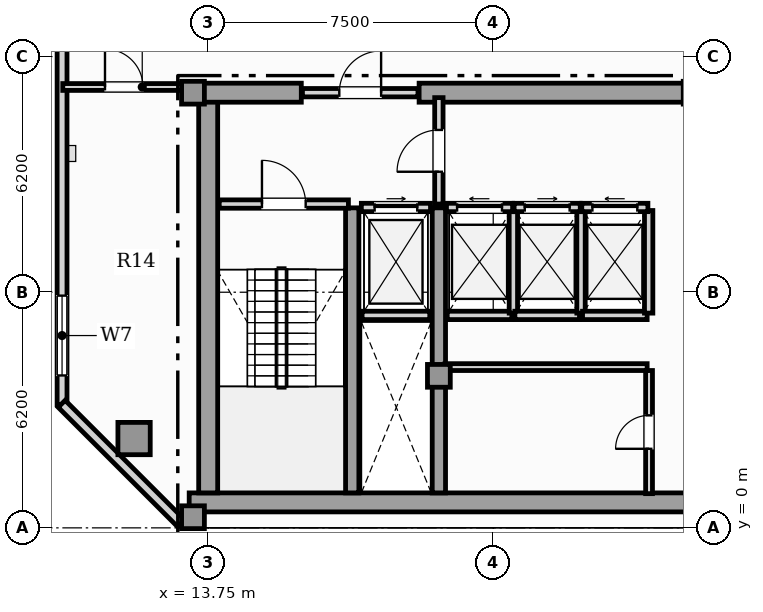
"""IFC4 building model, lengths in metres.
Left out: names, types, materials, properties, quantities, classifications, styles, units other than length and angle.
Written with IfcOpenShell. Run it as: python <this file> out.ifc"""

import sys

from ifc_helpers import new_model, si_unit, direction, frame, frame_2d, origin, origin_2d, place, context, subcontext, project, spatial, rectangle, hollow_rectangle, extrude, element, fill, save


model = new_model("IFC4")
c1 = context("Model", 3, precision=1e-05, world=origin(), true_north=direction((0.0, 1.0)))
c2 = subcontext(c1, "Body", "Model", "MODEL_VIEW")
j1 = project(units=[si_unit("LENGTHUNIT", "METRE"), si_unit("PLANEANGLEUNIT", "RADIAN")], contexts=[c1])
p1 = place(None, origin())
s1 = spatial("IfcSite", under=j1, at=p1, CompositionType="ELEMENT")
p2 = place(p1, origin())
s2 = spatial("IfcBuilding", under=s1, at=p2, CompositionType="ELEMENT")
p3 = place(p2, frame((0.0, 0.0, 362.25)))
s3 = spatial("IfcBuildingStorey", under=s2, at=p3, CompositionType="ELEMENT", Elevation=362.25)
p4 = place(p3, frame((13.25, 0.67, 0.0), z_axis=(0.0, 0.0, 1.0), x_axis=(1.0, 0.0, 0.0)))
e1 = element("IfcWall", 1, at=p4, inside=s3, PredefinedType="SHEAR", context=c2, shape_type="SweptSolid", body=[
    extrude(rectangle(XDim=31.0, YDim=0.5, at=frame_2d((15.5, 0.0))), origin(), (0.0, 0.0, 1.0), 4.1),
])
p5 = place(p3, frame((13.75, 0.92, 0.0), z_axis=(0.0, 0.0, 1.0), x_axis=(0.0, 1.0, 0.0)))
e2 = element("IfcWall", 2, at=p5, inside=s3, PredefinedType="SHEAR", context=c2, shape_type="SweptSolid", body=[
    extrude(rectangle(XDim=10.53, YDim=0.5, at=frame_2d((5.265, 0.0))), origin(), (0.0, 0.0, 1.0), 4.1),
])
p6 = place(p3, frame((13.25, 11.45, 0.0), z_axis=(0.0, 0.0, 1.0), x_axis=(1.0, 0.0, 0.0)))
e3 = element("IfcWall", 3, at=p6, inside=s3, PredefinedType="SHEAR", context=c2, shape_type="SweptSolid", body=[
    extrude(rectangle(XDim=2.95, YDim=0.5, at=frame_2d((1.475, 0.0))), origin(), (0.0, 0.0, 1.0), 4.1),
])
p7 = place(p3, frame((19.3, 11.45, 0.0), z_axis=(0.0, 0.0, 1.0), x_axis=(1.0, 0.0, 0.0)))
e4 = element("IfcWall", 4, at=p7, inside=s3, PredefinedType="SHEAR", context=c2, shape_type="SweptSolid", body=[
    extrude(rectangle(XDim=7.3, YDim=0.5, at=frame_2d((3.65, 0.0))), origin(), (0.0, 0.0, 1.0), 4.1),
])
for number, where, z_axis, x_axis in (
    (5, (17.54, 0.92, 0.0), (0.0, 0.0, 1.0), (0.0, 1.0, 0.0)),
    (6, (19.82, 0.92, 0.0), (0.0, 0.0, 1.0), (0.0, 1.0, 0.0)),
):
    element("IfcWall", number, at=place(p3, frame(where, z_axis=z_axis, x_axis=x_axis)), inside=s3, PredefinedType="SHEAR", context=c2, shape_type="SweptSolid", body=[
        extrude(rectangle(XDim=7.5, YDim=0.35, at=frame_2d((3.75, 0.0))), origin(), (0.0, 0.0, 1.0), 4.1),
    ])
for number, where, z_axis, x_axis in (
    (7, (13.35, 0.28, 0.0), (0.0, 0.0, 1.0), (1.0, 0.0, 0.0)),
    (8, (13.35, 11.45, 0.0), (0.0, 0.0, 1.0), (1.0, 0.0, 0.0)),
    (9, (19.82, 4.0, 0.0), (0.0, 0.0, 1.0), (1.0, 0.0, 0.0)),
    (10, (26.55, 11.45, 0.0), (0.0, 0.0, 1.0), (1.0, 0.0, 0.0)),
):
    element("IfcColumn", number, at=place(p3, frame(where, z_axis=z_axis, x_axis=x_axis)), inside=s3, PredefinedType="COLUMN", context=c2, shape_type="SweptSolid", body=[
        extrude(rectangle(XDim=0.6, YDim=0.6, at=origin_2d()), origin(), (0.0, 0.0, 1.0), 4.4),
    ])
p8 = place(p3, frame((11.8, 2.35, 0.0), z_axis=(0.0, 0.0, 1.0), x_axis=(1.0, 0.0, 0.0)))
e11 = element("IfcColumn", 11, at=p8, inside=s3, PredefinedType="USERDEFINED", context=c2, shape_type="SweptSolid", body=[
    extrude(hollow_rectangle(XDim=0.85, YDim=0.85, WallThickness=0.05, at=origin_2d()), origin(), (0.0, 0.0, 1.0), 4.35),
])
p9 = place(p3, frame((9.905, 27.38, 0.0), z_axis=(0.0, 0.0, 1.0), x_axis=(0.0, -1.0, 0.0)))
e12 = element("IfcWall", 12, at=p9, inside=s3, PredefinedType="SOLIDWALL", context=c2, shape_type="SweptSolid", body=[
    extrude(rectangle(XDim=24.14, YDim=0.26, at=frame_2d((12.07, 0.0))), origin(), (0.0, 0.0, 1.0), 4.1),
])
p10 = place(p9, frame((21.27, 0.0, 0.85)))
e13 = element("IfcOpeningElement", 13, at=p10, cuts=e12, PredefinedType="OPENING", context=c2, shape_type="SweptSolid", body=[
    extrude(rectangle(XDim=2.1, YDim=2.05, at=frame_2d((1.05, 1.025))), frame((0.0, 0.14, 0.0), z_axis=(0.0, -1.0, 0.0), x_axis=(1.0, 0.0, 0.0)), (0.0, 0.0, 1.0), 0.28),
])
p11 = place(p9, frame((2.83, 0.0, 0.95)))
e14 = element("IfcOpeningElement", 14, at=p11, cuts=e12, PredefinedType="OPENING", context=c2, shape_type="SweptSolid", body=[
    extrude(rectangle(XDim=0.9, YDim=1.5, at=frame_2d((0.45, 0.75))), frame((0.0, 0.14, 0.0), z_axis=(0.0, -1.0, 0.0), x_axis=(1.0, 0.0, 0.0)), (0.0, 0.0, 1.0), 0.28),
])
p12 = place(p9, frame((7.445, 0.0, 0.9)))
e15 = element("IfcOpeningElement", 15, at=p12, cuts=e12, PredefinedType="OPENING", context=c2, shape_type="SweptSolid", body=[
    extrude(rectangle(XDim=1.5, YDim=1.95, at=frame_2d((0.75, 0.975))), frame((0.0, 0.14, 0.0), z_axis=(0.0, -1.0, 0.0), x_axis=(1.0, 0.0, 0.0)), (0.0, 0.0, 1.0), 0.28),
])
p13 = place(p3, frame((9.895, 3.264, 0.0), z_axis=(0.0, 0.0, 1.0), x_axis=(0.707079321262, -0.707134240044, 0.0)))
e16 = element("IfcWall", 16, at=p13, inside=s3, PredefinedType="SOLIDWALL", context=c2, shape_type="SweptSolid", body=[
    extrude(rectangle(XDim=4.446, YDim=0.26, at=frame_2d((2.223, 0.0))), origin(), (0.0, 0.0, 1.0), 4.1),
])
p14 = place(p3, frame((17.8, 5.59, 0.0), z_axis=(0.0, 0.0, 1.0), x_axis=(1.0, 0.0, 0.0)))
e17 = element("IfcWall", 17, at=p14, inside=s3, PredefinedType="SOLIDWALL", context=c2, shape_type="SweptSolid", body=[
    extrude(rectangle(XDim=1.78, YDim=0.22, at=frame_2d((0.89, 0.0))), origin(), (0.0, 0.0, 1.0), 4.1),
])
p15 = place(p3, frame((17.78, 8.43, 0.0), z_axis=(0.0, 0.0, 1.0), x_axis=(1.0, 0.0, 0.0)))
e18 = element("IfcWall", 18, at=p15, inside=s3, PredefinedType="SOLIDWALL", context=c2, shape_type="SweptSolid", body=[
    extrude(rectangle(XDim=1.82, YDim=0.22, at=frame_2d((0.91, 0.0))), origin(), (0.0, 0.0, 1.0), 4.1),
])
p16 = place(p15, frame((0.35, 0.0, 0.0)))
e19 = element("IfcOpeningElement", 19, at=p16, cuts=e18, PredefinedType="OPENING", context=c2, shape_type="SweptSolid", body=[
    extrude(rectangle(XDim=1.12, YDim=2.25, at=frame_2d((0.56, 1.125))), frame((0.0, 0.12, 0.0), z_axis=(0.0, -1.0, 0.0), x_axis=(1.0, 0.0, 0.0)), (0.0, 0.0, 1.0), 0.24),
])
p17 = place(p3, frame((20.04, 5.59, 0.0), z_axis=(0.0, 0.0, 1.0), x_axis=(1.0, 0.0, 0.0)))
e20 = element("IfcWall", 20, at=p17, inside=s3, PredefinedType="SOLIDWALL", context=c2, shape_type="SweptSolid", body=[
    extrude(rectangle(XDim=1.7, YDim=0.22, at=frame_2d((0.85, 0.0))), origin(), (0.0, 0.0, 1.0), 4.1),
])
p18 = place(p3, frame((21.78, 5.65, 0.0), z_axis=(0.0, 0.0, 1.0), x_axis=(0.0, 1.0, 0.0)))
e21 = element("IfcWall", 21, at=p18, inside=s3, PredefinedType="SOLIDWALL", context=c2, shape_type="SweptSolid", body=[
    extrude(rectangle(XDim=2.7, YDim=0.22, at=frame_2d((1.35, 0.0))), origin(), (0.0, 0.0, 1.0), 4.1),
])
p19 = place(p3, frame((20.02, 8.43, 0.0), z_axis=(0.0, 0.0, 1.0), x_axis=(1.0, 0.0, 0.0)))
e22 = element("IfcWall", 22, at=p19, inside=s3, PredefinedType="SOLIDWALL", context=c2, shape_type="SweptSolid", body=[
    extrude(rectangle(XDim=1.74, YDim=0.22, at=frame_2d((0.87, 0.0))), origin(), (0.0, 0.0, 1.0), 4.1),
])
p20 = place(p19, frame((0.28, 0.0, 0.0)))
e23 = element("IfcOpeningElement", 23, at=p20, cuts=e22, PredefinedType="OPENING", context=c2, shape_type="SweptSolid", body=[
    extrude(rectangle(XDim=1.18, YDim=2.2, at=frame_2d((0.59, 1.1))), frame((0.0, 0.12, 0.0), z_axis=(0.0, -1.0, 0.0), x_axis=(1.0, 0.0, 0.0)), (0.0, 0.0, 1.0), 0.24),
])
p21 = place(p3, frame((21.82, 5.59, 0.0), z_axis=(0.0, 0.0, 1.0), x_axis=(1.0, 0.0, 0.0)))
e24 = element("IfcWall", 24, at=p21, inside=s3, PredefinedType="SOLIDWALL", context=c2, shape_type="SweptSolid", body=[
    extrude(rectangle(XDim=1.7, YDim=0.22, at=frame_2d((0.85, 0.0))), origin(), (0.0, 0.0, 1.0), 4.1),
])
p22 = place(p3, frame((23.56, 5.65, 0.0), z_axis=(0.0, 0.0, 1.0), x_axis=(0.0, 1.0, 0.0)))
e25 = element("IfcWall", 25, at=p22, inside=s3, PredefinedType="SOLIDWALL", context=c2, shape_type="SweptSolid", body=[
    extrude(rectangle(XDim=2.7, YDim=0.22, at=frame_2d((1.35, 0.0))), origin(), (0.0, 0.0, 1.0), 4.1),
])
p23 = place(p3, frame((21.8, 8.43, 0.0), z_axis=(0.0, 0.0, 1.0), x_axis=(1.0, 0.0, 0.0)))
e26 = element("IfcWall", 26, at=p23, inside=s3, PredefinedType="SOLIDWALL", context=c2, shape_type="SweptSolid", body=[
    extrude(rectangle(XDim=1.74, YDim=0.22, at=frame_2d((0.87, 0.0))), origin(), (0.0, 0.0, 1.0), 4.1),
])
p24 = place(p23, frame((0.28, 0.0, 0.0)))
e27 = element("IfcOpeningElement", 27, at=p24, cuts=e26, PredefinedType="OPENING", context=c2, shape_type="SweptSolid", body=[
    extrude(rectangle(XDim=1.18, YDim=2.2, at=frame_2d((0.59, 1.1))), frame((0.0, 0.12, 0.0), z_axis=(0.0, -1.0, 0.0), x_axis=(1.0, 0.0, 0.0)), (0.0, 0.0, 1.0), 0.24),
])
p25 = place(p3, frame((23.6, 5.59, 0.0), z_axis=(0.0, 0.0, 1.0), x_axis=(1.0, 0.0, 0.0)))
e28 = element("IfcWall", 28, at=p25, inside=s3, PredefinedType="SOLIDWALL", context=c2, shape_type="SweptSolid", body=[
    extrude(rectangle(XDim=1.7, YDim=0.22, at=frame_2d((0.85, 0.0))), origin(), (0.0, 0.0, 1.0), 4.1),
])
p26 = place(p3, frame((25.34, 5.65, 0.0), z_axis=(0.0, 0.0, 1.0), x_axis=(0.0, 1.0, 0.0)))
e29 = element("IfcWall", 29, at=p26, inside=s3, PredefinedType="SOLIDWALL", context=c2, shape_type="SweptSolid", body=[
    extrude(rectangle(XDim=2.7, YDim=0.22, at=frame_2d((1.35, 0.0))), origin(), (0.0, 0.0, 1.0), 4.1),
])
p27 = place(p3, frame((23.58, 8.43, 0.0), z_axis=(0.0, 0.0, 1.0), x_axis=(1.0, 0.0, 0.0)))
e30 = element("IfcWall", 30, at=p27, inside=s3, PredefinedType="SOLIDWALL", context=c2, shape_type="SweptSolid", body=[
    extrude(rectangle(XDim=1.74, YDim=0.22, at=frame_2d((0.87, 0.0))), origin(), (0.0, 0.0, 1.0), 4.1),
])
p28 = place(p27, frame((0.28, 0.0, 0.0)))
e31 = element("IfcOpeningElement", 31, at=p28, cuts=e30, PredefinedType="OPENING", context=c2, shape_type="SweptSolid", body=[
    extrude(rectangle(XDim=1.18, YDim=2.2, at=frame_2d((0.59, 1.1))), frame((0.0, 0.12, 0.0), z_axis=(0.0, -1.0, 0.0), x_axis=(1.0, 0.0, 0.0)), (0.0, 0.0, 1.0), 0.24),
])
p29 = place(p3, frame((14.04, 8.52, 0.0), z_axis=(0.0, 0.0, 1.0), x_axis=(1.0, 0.0, 0.0)))
e32 = element("IfcWall", 32, at=p29, inside=s3, PredefinedType="SOLIDWALL", context=c2, shape_type="SweptSolid", body=[
    extrude(rectangle(XDim=3.4, YDim=0.22, at=frame_2d((1.7, 0.0))), origin(), (0.0, 0.0, 1.0), 4.1),
])
p30 = place(p29, frame((1.125, 0.0, 0.0)))
e33 = element("IfcOpeningElement", 33, at=p30, cuts=e32, PredefinedType="OPENING", context=c2, shape_type="SweptSolid", body=[
    extrude(rectangle(XDim=1.15, YDim=2.2, at=frame_2d((0.575, 1.1))), frame((0.0, 0.12, 0.0), z_axis=(0.0, -1.0, 0.0), x_axis=(1.0, 0.0, 0.0)), (0.0, 0.0, 1.0), 0.24),
])
p31 = place(p3, frame((19.82, 8.52, 0.0), z_axis=(0.0, 0.0, 1.0), x_axis=(0.0, 1.0, 0.0)))
e34 = element("IfcWall", 34, at=p31, inside=s3, PredefinedType="SOLIDWALL", context=c2, shape_type="SweptSolid", body=[
    extrude(rectangle(XDim=2.8, YDim=0.22, at=frame_2d((1.4, 0.0))), origin(), (0.0, 0.0, 1.0), 3.555),
])
p32 = place(p31, frame((0.85, 0.0, 0.0)))
e35 = element("IfcOpeningElement", 35, at=p32, cuts=e34, PredefinedType="OPENING", context=c2, shape_type="SweptSolid", body=[
    extrude(rectangle(XDim=1.1, YDim=2.2, at=frame_2d((0.55, 1.1))), frame((0.0, 0.12, 0.0), z_axis=(0.0, -1.0, 0.0), x_axis=(1.0, 0.0, 0.0)), (0.0, 0.0, 1.0), 0.24),
])
p33 = place(p3, frame((16.23, 11.45, 0.0), z_axis=(0.0, 0.0, 1.0), x_axis=(1.0, 0.0, 0.0)))
e36 = element("IfcWall", 36, at=p33, inside=s3, PredefinedType="SOLIDWALL", context=c2, shape_type="SweptSolid", body=[
    extrude(rectangle(XDim=3.04, YDim=0.22, at=frame_2d((1.52, 0.0))), origin(), (0.0, 0.0, 1.0), 4.1),
])
p34 = place(p33, frame((0.97, 0.0, 0.0)))
e37 = element("IfcOpeningElement", 37, at=p34, cuts=e36, PredefinedType="OPENING", context=c2, shape_type="SweptSolid", body=[
    extrude(rectangle(XDim=1.1, YDim=2.2, at=frame_2d((0.55, 1.1))), frame((0.0, 0.12, 0.0), z_axis=(0.0, -1.0, 0.0), x_axis=(1.0, 0.0, 0.0)), (0.0, 0.0, 1.0), 0.24),
])
p35 = place(p3, frame((25.35, 0.9, 0.0), z_axis=(0.0, 0.0, 1.0), x_axis=(0.0, 1.0, 0.0)))
e38 = element("IfcWall", 38, at=p35, inside=s3, PredefinedType="PARTITIONING", context=c2, shape_type="SweptSolid", body=[
    extrude(rectangle(XDim=3.24, YDim=0.18, at=frame_2d((1.62, 0.0))), origin(), (0.0, 0.0, 1.0), 4.1),
])
p36 = place(p35, frame((1.18, 0.0, 0.0)))
e39 = element("IfcOpeningElement", 39, at=p36, cuts=e38, PredefinedType="OPENING", context=c2, shape_type="SweptSolid", body=[
    extrude(rectangle(XDim=0.88, YDim=2.05, at=frame_2d((0.44, 1.025))), frame((0.0, 0.1, 0.0), z_axis=(0.0, -1.0, 0.0), x_axis=(1.0, 0.0, 0.0)), (0.0, 0.0, 1.0), 0.2),
])
p37 = place(p3, frame((19.98, 4.23, 0.0), z_axis=(0.0, 0.0, 1.0), x_axis=(1.0, 0.0, 0.0)))
e40 = element("IfcWall", 40, at=p37, inside=s3, PredefinedType="PARTITIONING", context=c2, shape_type="SweptSolid", body=[
    extrude(rectangle(XDim=5.32, YDim=0.18, at=frame_2d((2.66, 0.0))), origin(), (0.0, 0.0, 1.0), 4.1),
])
p38 = place(p3, frame((9.925, 11.6, 0.0), z_axis=(0.0, 0.0, 1.0), x_axis=(1.0, 0.0, 0.0)))
e41 = element("IfcWall", 41, at=p38, inside=s3, PredefinedType="PARTITIONING", context=c2, shape_type="SweptSolid", body=[
    extrude(rectangle(XDim=3.22, YDim=0.18, at=frame_2d((1.61, 0.0))), origin(), (0.0, 0.0, 1.0), 4.1),
])
p39 = place(p38, frame((1.11, 0.0, 0.0)))
e42 = element("IfcOpeningElement", 42, at=p39, cuts=e41, PredefinedType="OPENING", context=c2, shape_type="SweptSolid", body=[
    extrude(rectangle(XDim=1.0, YDim=2.15, at=frame_2d((0.5, 1.075))), frame((0.0, 0.1, 0.0), z_axis=(0.0, -1.0, 0.0), x_axis=(1.0, 0.0, 0.0)), (0.0, 0.0, 1.0), 0.2),
])
p40 = place(p10, origin())
e43 = element("IfcWindow", 43, at=p40, inside=s3, PartitioningType="SINGLE_PANEL", PredefinedType="WINDOW", context=c2, shape_type="SweptSolid", body=[
    extrude(rectangle(XDim=2.1, YDim=2.05, at=frame_2d((1.05, 1.025))), frame((0.0, 0.03, 0.0), z_axis=(0.0, -1.0, 0.0), x_axis=(1.0, 0.0, 0.0)), (0.0, 0.0, 1.0), 0.06),
])
fill(e13, e43)
p41 = place(p16, origin())
e44 = element("IfcDoor", 44, at=p41, inside=s3, OperationType="SLIDING_TO_RIGHT", PredefinedType="DOOR", context=c2, shape_type="SweptSolid", body=[
    extrude(rectangle(XDim=1.12, YDim=2.25, at=frame_2d((0.56, 1.125))), frame((0.0, 0.025, 0.0), z_axis=(0.0, -1.0, 0.0), x_axis=(1.0, 0.0, 0.0)), (0.0, 0.0, 1.0), 0.05),
])
fill(e19, e44)
p42 = place(p20, origin())
e45 = element("IfcDoor", 45, at=p42, inside=s3, OperationType="SLIDING_TO_LEFT", PredefinedType="DOOR", context=c2, shape_type="SweptSolid", body=[
    extrude(rectangle(XDim=1.18, YDim=2.2, at=frame_2d((0.59, 1.1))), frame((0.0, 0.025, 0.0), z_axis=(0.0, -1.0, 0.0), x_axis=(1.0, 0.0, 0.0)), (0.0, 0.0, 1.0), 0.05),
])
fill(e23, e45)
p43 = place(p24, origin())
e46 = element("IfcDoor", 46, at=p43, inside=s3, OperationType="SLIDING_TO_RIGHT", PredefinedType="DOOR", context=c2, shape_type="SweptSolid", body=[
    extrude(rectangle(XDim=1.18, YDim=2.2, at=frame_2d((0.59, 1.1))), frame((0.0, 0.025, 0.0), z_axis=(0.0, -1.0, 0.0), x_axis=(1.0, 0.0, 0.0)), (0.0, 0.0, 1.0), 0.05),
])
fill(e27, e46)
p44 = place(p28, origin())
e47 = element("IfcDoor", 47, at=p44, inside=s3, OperationType="SLIDING_TO_LEFT", PredefinedType="DOOR", context=c2, shape_type="SweptSolid", body=[
    extrude(rectangle(XDim=1.18, YDim=2.2, at=frame_2d((0.59, 1.1))), frame((0.0, 0.025, 0.0), z_axis=(0.0, -1.0, 0.0), x_axis=(1.0, 0.0, 0.0)), (0.0, 0.0, 1.0), 0.05),
])
fill(e31, e47)
p45 = place(p30, origin())
e48 = element("IfcDoor", 48, at=p45, inside=s3, OperationType="SINGLE_SWING_LEFT", PredefinedType="DOOR", context=c2, shape_type="SweptSolid", body=[
    extrude(rectangle(XDim=1.15, YDim=2.2, at=frame_2d((0.575, 1.1))), frame((0.0, 0.025, 0.0), z_axis=(0.0, -1.0, 0.0), x_axis=(1.0, 0.0, 0.0)), (0.0, 0.0, 1.0), 0.05),
])
fill(e33, e48)
p46 = place(p32, origin())
e49 = element("IfcDoor", 49, at=p46, inside=s3, OperationType="SINGLE_SWING_LEFT", PredefinedType="DOOR", context=c2, shape_type="SweptSolid", body=[
    extrude(rectangle(XDim=1.1, YDim=2.2, at=frame_2d((0.55, 1.1))), frame((0.0, 0.025, 0.0), z_axis=(0.0, -1.0, 0.0), x_axis=(1.0, 0.0, 0.0)), (0.0, 0.0, 1.0), 0.05),
])
fill(e35, e49)
p47 = place(p34, origin())
e50 = element("IfcDoor", 50, at=p47, inside=s3, OperationType="SINGLE_SWING_RIGHT", PredefinedType="DOOR", context=c2, shape_type="SweptSolid", body=[
    extrude(rectangle(XDim=1.1, YDim=2.2, at=frame_2d((0.55, 1.1))), frame((0.0, 0.025, 0.0), z_axis=(0.0, -1.0, 0.0), x_axis=(1.0, 0.0, 0.0)), (0.0, 0.0, 1.0), 0.05),
])
fill(e37, e50)
p48 = place(p36, origin())
e51 = element("IfcDoor", 51, at=p48, inside=s3, OperationType="SINGLE_SWING_LEFT", PredefinedType="DOOR", context=c2, shape_type="SweptSolid", body=[
    extrude(rectangle(XDim=0.88, YDim=2.05, at=frame_2d((0.44, 1.025))), frame((0.0, 0.025, 0.0), z_axis=(0.0, -1.0, 0.0), x_axis=(1.0, 0.0, 0.0)), (0.0, 0.0, 1.0), 0.05),
])
fill(e39, e51)
p49 = place(p39, origin())
e52 = element("IfcDoor", 52, at=p49, inside=s3, OperationType="SINGLE_SWING_LEFT", PredefinedType="DOOR", context=c2, shape_type="SweptSolid", body=[
    extrude(rectangle(XDim=1.0, YDim=2.15, at=frame_2d((0.5, 1.075))), frame((0.0, 0.025, 0.0), z_axis=(0.0, -1.0, 0.0), x_axis=(1.0, 0.0, 0.0)), (0.0, 0.0, 1.0), 0.05),
])
fill(e42, e52)
save(model, sys.argv[1])
